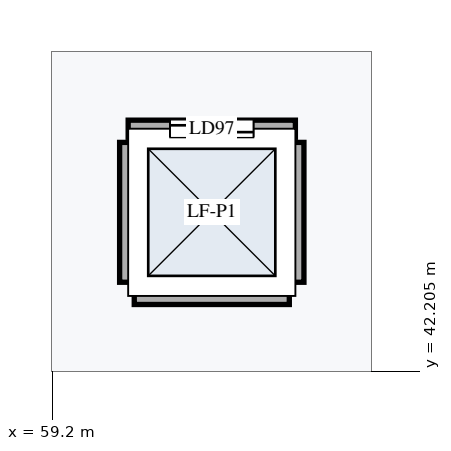
"""IFC4 building model, lengths in metres.
Left out: names, types, materials, properties, quantities, classifications, styles, units other than length and angle.
Written with IfcOpenShell. Run it as: python <this file> out.ifc"""

import sys

from ifc_helpers import new_model, si_unit, direction, frame, frame_2d, origin, place, context, subcontext, project, spatial, rectangle, extrude, element, fill, save


model = new_model("IFC4")
c1 = context("Model", 3, precision=1e-05, world=origin(), true_north=direction((0.0, 1.0)))
c2 = subcontext(c1, "Body", "Model", "MODEL_VIEW")
j1 = project(units=[si_unit("LENGTHUNIT", "METRE"), si_unit("PLANEANGLEUNIT", "RADIAN")], contexts=[c1])
p1 = place(None, origin())
s1 = spatial("IfcSite", under=j1, at=p1, CompositionType="ELEMENT")
p2 = place(p1, origin())
s2 = spatial("IfcBuilding", under=s1, at=p2, CompositionType="ELEMENT")
p3 = place(p2, frame((0.0, 0.0, -3.8)))
s3 = spatial("IfcBuildingStorey", under=s2, at=p3, CompositionType="ELEMENT", Elevation=-3.8)
p4 = place(p3, frame((60.2, 45.4, 0.0), z_axis=(0.0, 0.0, 1.0), x_axis=(1.0, 0.0, 0.0)))
e1 = element("IfcWall", 1, at=p4, inside=s3, PredefinedType="STANDARD", context=c2, shape_type="SweptSolid", body=[
    extrude(rectangle(XDim=2.2, YDim=0.225, at=frame_2d((1.1, 0.0))), origin(), (0.0, 0.0, 1.0), 3.52),
])
p5 = place(p4, frame((0.55, 0.0, 0.0)))
e2 = element("IfcOpeningElement", 2, at=p5, cuts=e1, PredefinedType="OPENING", context=c2, shape_type="SweptSolid", body=[
    extrude(rectangle(XDim=1.1, YDim=2.1, at=frame_2d((0.55, 1.05))), frame((0.0, 0.123, 0.0), z_axis=(0.0, -1.0, 0.0), x_axis=(1.0, 0.0, 0.0)), (0.0, 0.0, 1.0), 0.245),
])
p6 = place(p3, frame((60.28, 43.2, 0.0), z_axis=(0.0, 0.0, 1.0), x_axis=(1.0, 0.0, 0.0)))
e3 = element("IfcWall", 3, at=p6, inside=s3, PredefinedType="STANDARD", context=c2, shape_type="SweptSolid", body=[
    extrude(rectangle(XDim=2.04, YDim=0.225, at=frame_2d((1.02, 0.0))), origin(), (0.0, 0.0, 1.0), 3.52),
])
for number, where, z_axis, x_axis in (
    (4, (60.2, 43.38, 0.0), (0.0, 0.0, 1.0), (0.0, 1.0, 0.0)),
    (5, (62.4, 43.38, 0.0), (0.0, 0.0, 1.0), (0.0, 1.0, 0.0)),
):
    element("IfcWall", number, at=place(p3, frame(where, z_axis=z_axis, x_axis=x_axis)), inside=s3, PredefinedType="STANDARD", context=c2, shape_type="SweptSolid", body=[
        extrude(rectangle(XDim=1.84, YDim=0.225, at=frame_2d((0.92, 0.0))), origin(), (0.0, 0.0, 1.0), 3.52),
    ])
p7 = place(p5, origin())
e6 = element("IfcDoor", 6, at=p7, inside=s3, OperationType="DOUBLE_DOOR_SLIDING", PredefinedType="DOOR", context=c2, shape_type="SweptSolid", body=[
    extrude(rectangle(XDim=1.1, YDim=2.1, at=frame_2d((0.55, 1.05))), frame((0.0, 0.025, 0.0), z_axis=(0.0, -1.0, 0.0), x_axis=(1.0, 0.0, 0.0)), (0.0, 0.0, 1.0), 0.05),
])
fill(e2, e6)
save(model, sys.argv[1])
